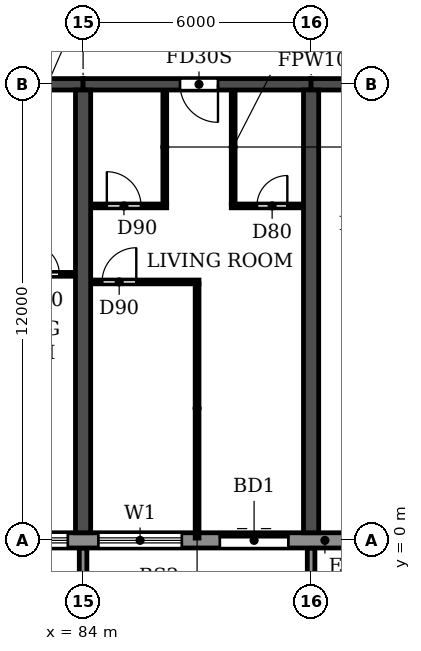
"""IFC4 building model, lengths in metres.
Left out: names, types, materials, properties, quantities, classifications, styles, units other than length and angle.
Written with IfcOpenShell. Run it as: python <this file> out.ifc"""

import sys

from ifc_helpers import new_model, si_unit, direction, frame, frame_2d, origin, place, context, subcontext, project, spatial, polyline, rectangle, outline, extrude, source, transform, mapped, element, fill, save


model = new_model("IFC4")
c1 = context("Model", 3, precision=1e-05, world=origin(), true_north=direction((0.0, 1.0)))
c2 = subcontext(c1, "Body", "Model", "MODEL_VIEW")
j1 = project(units=[si_unit("LENGTHUNIT", "METRE"), si_unit("PLANEANGLEUNIT", "RADIAN")], contexts=[c1])
p1 = place(None, origin())
s1 = spatial("IfcSite", under=j1, at=p1, CompositionType="ELEMENT")
p2 = place(p1, origin())
s2 = spatial("IfcBuilding", under=s1, at=p2, CompositionType="ELEMENT")
p3 = place(p2, frame((0.0, 0.0, 56.4)))
s3 = spatial("IfcBuildingStorey", under=s2, at=p3, CompositionType="ELEMENT", Elevation=56.4)
for number, where, z_axis, x_axis in (
    (1, (84.0, 0.2, 0.0), (0.0, 0.0, 1.0), (0.0, 1.0, 0.0)),
    (2, (90.0, 0.2, 0.0), (0.0, 0.0, 1.0), (0.0, 1.0, 0.0)),
):
    element("IfcWall", number, at=place(p3, frame(where, z_axis=z_axis, x_axis=x_axis)), inside=s3, PredefinedType="SHEAR", context=c2, shape_type="SweptSolid", body=[
        extrude(rectangle(XDim=11.65, YDim=0.4, at=frame_2d((5.825, 0.0))), origin(), (0.0, 0.0, 1.0), 3.05),
    ])
p4 = place(p3, frame((78.0, 12.0, 0.0), z_axis=(0.0, 0.0, 1.0), x_axis=(1.0, 0.0, 0.0)))
e3 = element("IfcWall", 3, at=p4, inside=s3, PredefinedType="SHEAR", context=c2, shape_type="SweptSolid", body=[
    extrude(rectangle(XDim=6.0, YDim=0.3, at=frame_2d((3.0, 0.0))), origin(), (0.0, 0.0, 1.0), 2.45),
])
p5 = place(p4, frame((2.55, 0.0, 0.0)))
e4 = element("IfcOpeningElement", 4, at=p5, cuts=e3, PredefinedType="OPENING", context=c2, shape_type="SweptSolid", body=[
    extrude(rectangle(XDim=1.0, YDim=2.1, at=frame_2d((0.5, 1.05))), frame((0.0, 0.16, 0.0), z_axis=(0.0, -1.0, 0.0), x_axis=(1.0, 0.0, 0.0)), (0.0, 0.0, 1.0), 0.32),
])
p6 = place(p3, frame((84.0, 12.0, 0.0), z_axis=(0.0, 0.0, 1.0), x_axis=(1.0, 0.0, 0.0)))
e5 = element("IfcWall", 5, at=p6, inside=s3, PredefinedType="SHEAR", context=c2, shape_type="SweptSolid", body=[
    extrude(rectangle(XDim=6.0, YDim=0.3, at=frame_2d((3.0, 0.0))), origin(), (0.0, 0.0, 1.0), 2.45),
])
p7 = place(p6, frame((2.55, 0.0, 0.0)))
e6 = element("IfcOpeningElement", 6, at=p7, cuts=e5, PredefinedType="OPENING", context=c2, shape_type="SweptSolid", body=[
    extrude(rectangle(XDim=1.0, YDim=2.1, at=frame_2d((0.5, 1.05))), frame((0.0, 0.16, 0.0), z_axis=(0.0, -1.0, 0.0), x_axis=(1.0, 0.0, 0.0)), (0.0, 0.0, 1.0), 0.32),
])
p8 = place(p3, frame((90.0, 12.0, 0.0), z_axis=(0.0, 0.0, 1.0), x_axis=(1.0, 0.0, 0.0)))
e7 = element("IfcWall", 7, at=p8, inside=s3, PredefinedType="SHEAR", context=c2, shape_type="SweptSolid", body=[
    extrude(rectangle(XDim=5.8, YDim=0.3, at=frame_2d((2.9, 0.0))), origin(), (0.0, 0.0, 1.0), 2.45),
])
p9 = place(p8, frame((2.5, 0.0, 0.0)))
e8 = element("IfcOpeningElement", 8, at=p9, cuts=e7, PredefinedType="OPENING", context=c2, shape_type="SweptSolid", body=[
    extrude(rectangle(XDim=1.0, YDim=2.1, at=frame_2d((0.5, 1.05))), frame((0.0, 0.16, 0.0), z_axis=(0.0, -1.0, 0.0), x_axis=(1.0, 0.0, 0.0)), (0.0, 0.0, 1.0), 0.32),
])
p10 = place(p3, frame((10.683, 0.0, 0.0), z_axis=(0.0, 0.0, 1.0), x_axis=(1.0, 0.0, 0.0)))
e9 = element("IfcWall", 9, at=p10, inside=s3, PredefinedType="STANDARD", context=c2, shape_type="SweptSolid", body=[
    extrude(rectangle(XDim=80.634, YDim=0.4, at=frame_2d((40.317, 0.0))), origin(), (0.0, 0.0, 1.0), 3.05),
])
p11 = place(p10, frame((1.717, 0.0, 0.9)))
e10 = element("IfcOpeningElement", 10, at=p11, cuts=e9, PredefinedType="OPENING", context=c2, shape_type="SweptSolid", body=[
    extrude(rectangle(XDim=2.2, YDim=1.5, at=frame_2d((1.1, 0.75))), frame((0.0, 0.21, 0.0), z_axis=(0.0, -1.0, 0.0), x_axis=(1.0, 0.0, 0.0)), (0.0, 0.0, 1.0), 0.42),
])
p12 = place(p10, frame((4.917, 0.0, 0.0)))
e11 = element("IfcOpeningElement", 11, at=p12, cuts=e9, PredefinedType="OPENING", context=c2, shape_type="SweptSolid", body=[
    extrude(rectangle(XDim=1.8, YDim=2.4, at=frame_2d((0.9, 1.2))), frame((0.0, 0.21, 0.0), z_axis=(0.0, -1.0, 0.0), x_axis=(1.0, 0.0, 0.0)), (0.0, 0.0, 1.0), 0.42),
])
p13 = place(p10, frame((7.717, 0.0, 0.9)))
e12 = element("IfcOpeningElement", 12, at=p13, cuts=e9, PredefinedType="OPENING", context=c2, shape_type="SweptSolid", body=[
    extrude(rectangle(XDim=2.2, YDim=1.5, at=frame_2d((1.1, 0.75))), frame((0.0, 0.21, 0.0), z_axis=(0.0, -1.0, 0.0), x_axis=(1.0, 0.0, 0.0)), (0.0, 0.0, 1.0), 0.42),
])
p14 = place(p10, frame((10.717, 0.0, 0.9)))
e13 = element("IfcOpeningElement", 13, at=p14, cuts=e9, PredefinedType="OPENING", context=c2, shape_type="SweptSolid", body=[
    extrude(rectangle(XDim=2.2, YDim=1.5, at=frame_2d((1.1, 0.75))), frame((0.0, 0.21, 0.0), z_axis=(0.0, -1.0, 0.0), x_axis=(1.0, 0.0, 0.0)), (0.0, 0.0, 1.0), 0.42),
])
p15 = place(p10, frame((13.717, 0.0, 0.9)))
e14 = element("IfcOpeningElement", 14, at=p15, cuts=e9, PredefinedType="OPENING", context=c2, shape_type="SweptSolid", body=[
    extrude(rectangle(XDim=2.2, YDim=1.5, at=frame_2d((1.1, 0.75))), frame((0.0, 0.21, 0.0), z_axis=(0.0, -1.0, 0.0), x_axis=(1.0, 0.0, 0.0)), (0.0, 0.0, 1.0), 0.42),
])
p16 = place(p10, frame((16.917, 0.0, 0.0)))
e15 = element("IfcOpeningElement", 15, at=p16, cuts=e9, PredefinedType="OPENING", context=c2, shape_type="SweptSolid", body=[
    extrude(rectangle(XDim=1.8, YDim=2.4, at=frame_2d((0.9, 1.2))), frame((0.0, 0.21, 0.0), z_axis=(0.0, -1.0, 0.0), x_axis=(1.0, 0.0, 0.0)), (0.0, 0.0, 1.0), 0.42),
])
p17 = place(p10, frame((19.717, 0.0, 0.9)))
e16 = element("IfcOpeningElement", 16, at=p17, cuts=e9, PredefinedType="OPENING", context=c2, shape_type="SweptSolid", body=[
    extrude(rectangle(XDim=2.2, YDim=1.5, at=frame_2d((1.1, 0.75))), frame((0.0, 0.21, 0.0), z_axis=(0.0, -1.0, 0.0), x_axis=(1.0, 0.0, 0.0)), (0.0, 0.0, 1.0), 0.42),
])
p18 = place(p10, frame((22.717, 0.0, 0.9)))
e17 = element("IfcOpeningElement", 17, at=p18, cuts=e9, PredefinedType="OPENING", context=c2, shape_type="SweptSolid", body=[
    extrude(rectangle(XDim=2.2, YDim=1.5, at=frame_2d((1.1, 0.75))), frame((0.0, 0.21, 0.0), z_axis=(0.0, -1.0, 0.0), x_axis=(1.0, 0.0, 0.0)), (0.0, 0.0, 1.0), 0.42),
])
p19 = place(p10, frame((25.917, 0.0, 0.0)))
e18 = element("IfcOpeningElement", 18, at=p19, cuts=e9, PredefinedType="OPENING", context=c2, shape_type="SweptSolid", body=[
    extrude(rectangle(XDim=1.8, YDim=2.4, at=frame_2d((0.9, 1.2))), frame((0.0, 0.21, 0.0), z_axis=(0.0, -1.0, 0.0), x_axis=(1.0, 0.0, 0.0)), (0.0, 0.0, 1.0), 0.42),
])
p20 = place(p10, frame((28.717, 0.0, 0.9)))
e19 = element("IfcOpeningElement", 19, at=p20, cuts=e9, PredefinedType="OPENING", context=c2, shape_type="SweptSolid", body=[
    extrude(rectangle(XDim=2.2, YDim=1.5, at=frame_2d((1.1, 0.75))), frame((0.0, 0.21, 0.0), z_axis=(0.0, -1.0, 0.0), x_axis=(1.0, 0.0, 0.0)), (0.0, 0.0, 1.0), 0.42),
])
p21 = place(p10, frame((31.717, 0.0, 0.9)))
e20 = element("IfcOpeningElement", 20, at=p21, cuts=e9, PredefinedType="OPENING", context=c2, shape_type="SweptSolid", body=[
    extrude(rectangle(XDim=2.2, YDim=1.5, at=frame_2d((1.1, 0.75))), frame((0.0, 0.21, 0.0), z_axis=(0.0, -1.0, 0.0), x_axis=(1.0, 0.0, 0.0)), (0.0, 0.0, 1.0), 0.42),
])
p22 = place(p10, frame((34.717, 0.0, 0.9)))
e21 = element("IfcOpeningElement", 21, at=p22, cuts=e9, PredefinedType="OPENING", context=c2, shape_type="SweptSolid", body=[
    extrude(rectangle(XDim=2.2, YDim=1.5, at=frame_2d((1.1, 0.75))), frame((0.0, 0.21, 0.0), z_axis=(0.0, -1.0, 0.0), x_axis=(1.0, 0.0, 0.0)), (0.0, 0.0, 1.0), 0.42),
])
p23 = place(p10, frame((37.717, 0.0, 0.9)))
e22 = element("IfcOpeningElement", 22, at=p23, cuts=e9, PredefinedType="OPENING", context=c2, shape_type="SweptSolid", body=[
    extrude(rectangle(XDim=2.2, YDim=1.5, at=frame_2d((1.1, 0.75))), frame((0.0, 0.21, 0.0), z_axis=(0.0, -1.0, 0.0), x_axis=(1.0, 0.0, 0.0)), (0.0, 0.0, 1.0), 0.42),
])
p24 = place(p10, frame((40.917, 0.0, 0.0)))
e23 = element("IfcOpeningElement", 23, at=p24, cuts=e9, PredefinedType="OPENING", context=c2, shape_type="SweptSolid", body=[
    extrude(rectangle(XDim=1.8, YDim=2.4, at=frame_2d((0.9, 1.2))), frame((0.0, 0.21, 0.0), z_axis=(0.0, -1.0, 0.0), x_axis=(1.0, 0.0, 0.0)), (0.0, 0.0, 1.0), 0.42),
])
p25 = place(p10, frame((43.717, 0.0, 0.9)))
e24 = element("IfcOpeningElement", 24, at=p25, cuts=e9, PredefinedType="OPENING", context=c2, shape_type="SweptSolid", body=[
    extrude(rectangle(XDim=2.2, YDim=1.5, at=frame_2d((1.1, 0.75))), frame((0.0, 0.21, 0.0), z_axis=(0.0, -1.0, 0.0), x_axis=(1.0, 0.0, 0.0)), (0.0, 0.0, 1.0), 0.42),
])
p26 = place(p10, frame((46.717, 0.0, 0.9)))
e25 = element("IfcOpeningElement", 25, at=p26, cuts=e9, PredefinedType="OPENING", context=c2, shape_type="SweptSolid", body=[
    extrude(rectangle(XDim=2.2, YDim=1.5, at=frame_2d((1.1, 0.75))), frame((0.0, 0.21, 0.0), z_axis=(0.0, -1.0, 0.0), x_axis=(1.0, 0.0, 0.0)), (0.0, 0.0, 1.0), 0.42),
])
p27 = place(p10, frame((49.717, 0.0, 0.9)))
e26 = element("IfcOpeningElement", 26, at=p27, cuts=e9, PredefinedType="OPENING", context=c2, shape_type="SweptSolid", body=[
    extrude(rectangle(XDim=2.2, YDim=1.5, at=frame_2d((1.1, 0.75))), frame((0.0, 0.21, 0.0), z_axis=(0.0, -1.0, 0.0), x_axis=(1.0, 0.0, 0.0)), (0.0, 0.0, 1.0), 0.42),
])
p28 = place(p10, frame((52.717, 0.0, 0.9)))
e27 = element("IfcOpeningElement", 27, at=p28, cuts=e9, PredefinedType="OPENING", context=c2, shape_type="SweptSolid", body=[
    extrude(rectangle(XDim=2.2, YDim=1.5, at=frame_2d((1.1, 0.75))), frame((0.0, 0.21, 0.0), z_axis=(0.0, -1.0, 0.0), x_axis=(1.0, 0.0, 0.0)), (0.0, 0.0, 1.0), 0.42),
])
p29 = place(p10, frame((55.717, 0.0, 0.9)))
e28 = element("IfcOpeningElement", 28, at=p29, cuts=e9, PredefinedType="OPENING", context=c2, shape_type="SweptSolid", body=[
    extrude(rectangle(XDim=2.2, YDim=1.5, at=frame_2d((1.1, 0.75))), frame((0.0, 0.21, 0.0), z_axis=(0.0, -1.0, 0.0), x_axis=(1.0, 0.0, 0.0)), (0.0, 0.0, 1.0), 0.42),
])
p30 = place(p10, frame((58.717, 0.0, 0.9)))
e29 = element("IfcOpeningElement", 29, at=p30, cuts=e9, PredefinedType="OPENING", context=c2, shape_type="SweptSolid", body=[
    extrude(rectangle(XDim=2.2, YDim=1.5, at=frame_2d((1.1, 0.75))), frame((0.0, 0.21, 0.0), z_axis=(0.0, -1.0, 0.0), x_axis=(1.0, 0.0, 0.0)), (0.0, 0.0, 1.0), 0.42),
])
p31 = place(p10, frame((61.717, 0.0, 0.9)))
e30 = element("IfcOpeningElement", 30, at=p31, cuts=e9, PredefinedType="OPENING", context=c2, shape_type="SweptSolid", body=[
    extrude(rectangle(XDim=2.2, YDim=1.5, at=frame_2d((1.1, 0.75))), frame((0.0, 0.21, 0.0), z_axis=(0.0, -1.0, 0.0), x_axis=(1.0, 0.0, 0.0)), (0.0, 0.0, 1.0), 0.42),
])
p32 = place(p10, frame((64.917, 0.0, 0.0)))
e31 = element("IfcOpeningElement", 31, at=p32, cuts=e9, PredefinedType="OPENING", context=c2, shape_type="SweptSolid", body=[
    extrude(rectangle(XDim=1.8, YDim=2.4, at=frame_2d((0.9, 1.2))), frame((0.0, 0.21, 0.0), z_axis=(0.0, -1.0, 0.0), x_axis=(1.0, 0.0, 0.0)), (0.0, 0.0, 1.0), 0.42),
])
p33 = place(p10, frame((67.717, 0.0, 0.9)))
e32 = element("IfcOpeningElement", 32, at=p33, cuts=e9, PredefinedType="OPENING", context=c2, shape_type="SweptSolid", body=[
    extrude(rectangle(XDim=2.2, YDim=1.5, at=frame_2d((1.1, 0.75))), frame((0.0, 0.21, 0.0), z_axis=(0.0, -1.0, 0.0), x_axis=(1.0, 0.0, 0.0)), (0.0, 0.0, 1.0), 0.42),
])
p34 = place(p10, frame((70.717, 0.0, 0.9)))
e33 = element("IfcOpeningElement", 33, at=p34, cuts=e9, PredefinedType="OPENING", context=c2, shape_type="SweptSolid", body=[
    extrude(rectangle(XDim=2.2, YDim=1.5, at=frame_2d((1.1, 0.75))), frame((0.0, 0.21, 0.0), z_axis=(0.0, -1.0, 0.0), x_axis=(1.0, 0.0, 0.0)), (0.0, 0.0, 1.0), 0.42),
])
p35 = place(p10, frame((73.717, 0.0, 0.9)))
e34 = element("IfcOpeningElement", 34, at=p35, cuts=e9, PredefinedType="OPENING", context=c2, shape_type="SweptSolid", body=[
    extrude(rectangle(XDim=2.2, YDim=1.5, at=frame_2d((1.1, 0.75))), frame((0.0, 0.21, 0.0), z_axis=(0.0, -1.0, 0.0), x_axis=(1.0, 0.0, 0.0)), (0.0, 0.0, 1.0), 0.42),
])
p36 = place(p10, frame((76.917, 0.0, 0.0)))
e35 = element("IfcOpeningElement", 35, at=p36, cuts=e9, PredefinedType="OPENING", context=c2, shape_type="SweptSolid", body=[
    extrude(rectangle(XDim=1.8, YDim=2.4, at=frame_2d((0.9, 1.2))), frame((0.0, 0.21, 0.0), z_axis=(0.0, -1.0, 0.0), x_axis=(1.0, 0.0, 0.0)), (0.0, 0.0, 1.0), 0.42),
])
m1 = source(origin(), c2, "Body", "SweptSolid", [
    extrude(outline(polyline([(0.0, 0.0), (0.2, 0.0), (0.2, 1.65), (0.0, 1.65), (0.0, 0.0)])), origin(), (0.0, 0.0, 1.0), 3.1),
])
for number, where in (
    (36, (83.9, -1.85, 0.0)),
    (37, (89.9, -1.85, 0.0)),
):
    element("IfcWall", number, at=place(p3, frame(where)), inside=s3, PredefinedType="STANDARD", context=c2, shape_type="MappedRepresentation", body=[
        mapped(m1, transform((0.0, 0.0, 0.0))),
    ])
p37 = place(p3, frame((84.21, 6.8, 0.0), z_axis=(0.0, 0.0, 1.0), x_axis=(1.0, 0.0, 0.0)))
e38 = element("IfcWall", 38, at=p37, inside=s3, PredefinedType="PARTITIONING", context=c2, shape_type="SweptSolid", body=[
    extrude(rectangle(XDim=2.84, YDim=0.1, at=frame_2d((1.42, 0.0))), origin(), (0.0, 0.0, 1.0), 3.05),
])
p38 = place(p37, frame((0.29, 0.0, 0.0)))
e39 = element("IfcOpeningElement", 39, at=p38, cuts=e38, PredefinedType="OPENING", context=c2, shape_type="SweptSolid", body=[
    extrude(rectangle(XDim=0.9, YDim=2.1, at=frame_2d((0.45, 1.05))), frame((0.0, 0.06, 0.0), z_axis=(0.0, -1.0, 0.0), x_axis=(1.0, 0.0, 0.0)), (0.0, 0.0, 1.0), 0.12),
])
p39 = place(p3, frame((81.9, 7.0, 0.0), z_axis=(0.0, 0.0, 1.0), x_axis=(1.0, 0.0, 0.0)))
e40 = element("IfcWall", 40, at=p39, inside=s3, PredefinedType="PARTITIONING", context=c2, shape_type="SweptSolid", body=[
    extrude(rectangle(XDim=1.89, YDim=0.1, at=frame_2d((0.945, 0.0))), origin(), (0.0, 0.0, 1.0), 3.05),
])
p40 = place(p39, frame((0.675, 0.0, 0.0)))
e41 = element("IfcOpeningElement", 41, at=p40, cuts=e40, PredefinedType="OPENING", context=c2, shape_type="SweptSolid", body=[
    extrude(rectangle(XDim=0.8, YDim=2.1, at=frame_2d((0.4, 1.05))), frame((0.0, 0.06, 0.0), z_axis=(0.0, -1.0, 0.0), x_axis=(1.0, 0.0, 0.0)), (0.0, 0.0, 1.0), 0.12),
])
p41 = place(p3, frame((84.21, 8.8, 0.0), z_axis=(0.0, 0.0, 1.0), x_axis=(1.0, 0.0, 0.0)))
e42 = element("IfcWall", 42, at=p41, inside=s3, PredefinedType="PARTITIONING", context=c2, shape_type="SweptSolid", body=[
    extrude(rectangle(XDim=1.99, YDim=0.1, at=frame_2d((0.995, 0.0))), origin(), (0.0, 0.0, 1.0), 3.05),
])
p42 = place(p41, frame((0.415, 0.0, 0.0)))
e43 = element("IfcOpeningElement", 43, at=p42, cuts=e42, PredefinedType="OPENING", context=c2, shape_type="SweptSolid", body=[
    extrude(rectangle(XDim=0.9, YDim=2.1, at=frame_2d((0.45, 1.05))), frame((0.0, 0.06, 0.0), z_axis=(0.0, -1.0, 0.0), x_axis=(1.0, 0.0, 0.0)), (0.0, 0.0, 1.0), 0.12),
])
p43 = place(p3, frame((87.9, 8.8, 0.0), z_axis=(0.0, 0.0, 1.0), x_axis=(1.0, 0.0, 0.0)))
e44 = element("IfcWall", 44, at=p43, inside=s3, PredefinedType="PARTITIONING", context=c2, shape_type="SweptSolid", body=[
    extrude(rectangle(XDim=1.89, YDim=0.1, at=frame_2d((0.945, 0.0))), origin(), (0.0, 0.0, 1.0), 3.05),
])
p44 = place(p43, frame((0.675, 0.0, 0.0)))
e45 = element("IfcOpeningElement", 45, at=p44, cuts=e44, PredefinedType="OPENING", context=c2, shape_type="SweptSolid", body=[
    extrude(rectangle(XDim=0.8, YDim=2.1, at=frame_2d((0.4, 1.05))), frame((0.0, 0.06, 0.0), z_axis=(0.0, -1.0, 0.0), x_axis=(1.0, 0.0, 0.0)), (0.0, 0.0, 1.0), 0.12),
])
p45 = place(p3, frame((86.15, 8.85, 0.0), z_axis=(0.0, 0.0, 1.0), x_axis=(0.0, 1.0, 0.0)))
e46 = element("IfcWall", 46, at=p45, inside=s3, PredefinedType="PARTITIONING", context=c2, shape_type="SweptSolid", body=[
    extrude(rectangle(XDim=2.99, YDim=0.1, at=frame_2d((1.495, 0.0))), origin(), (0.0, 0.0, 1.0), 3.05),
])
p46 = place(p3, frame((87.0, 0.06, 0.0), z_axis=(0.0, 0.0, 1.0), x_axis=(0.0, 1.0, 0.0)))
e47 = element("IfcWall", 47, at=p46, inside=s3, PredefinedType="PARTITIONING", context=c2, shape_type="SweptSolid", body=[
    extrude(rectangle(XDim=6.69, YDim=0.1, at=frame_2d((3.345, 0.0))), origin(), (0.0, 0.0, 1.0), 3.05),
])
p47 = place(p3, frame((87.95, 8.85, 0.0), z_axis=(0.0, 0.0, 1.0), x_axis=(0.0, 1.0, 0.0)))
e48 = element("IfcWall", 48, at=p47, inside=s3, PredefinedType="PARTITIONING", context=c2, shape_type="SweptSolid", body=[
    extrude(rectangle(XDim=2.99, YDim=0.1, at=frame_2d((1.495, 0.0))), origin(), (0.0, 0.0, 1.0), 3.05),
])
p48 = place(p34, origin())
e49 = element("IfcWindow", 49, at=p48, inside=s3, PartitioningType="DOUBLE_PANEL_HORIZONTAL", PredefinedType="WINDOW", context=c2, shape_type="SweptSolid", body=[
    extrude(rectangle(XDim=2.2, YDim=1.5, at=frame_2d((1.1, 0.75))), frame((0.0, 0.03, 0.0), z_axis=(0.0, -1.0, 0.0), x_axis=(1.0, 0.0, 0.0)), (0.0, 0.0, 1.0), 0.06),
])
fill(e33, e49)
p49 = place(p35, origin())
e50 = element("IfcWindow", 50, at=p49, inside=s3, PartitioningType="DOUBLE_PANEL_HORIZONTAL", PredefinedType="WINDOW", context=c2, shape_type="SweptSolid", body=[
    extrude(rectangle(XDim=2.2, YDim=1.5, at=frame_2d((1.1, 0.75))), frame((0.0, 0.03, 0.0), z_axis=(0.0, -1.0, 0.0), x_axis=(1.0, 0.0, 0.0)), (0.0, 0.0, 1.0), 0.06),
])
fill(e34, e50)
p50 = place(p36, origin())
e51 = element("IfcDoor", 51, at=p50, inside=s3, OperationType="DOUBLE_DOOR_SLIDING", PredefinedType="DOOR", context=c2, shape_type="SweptSolid", body=[
    extrude(rectangle(XDim=1.8, YDim=2.4, at=frame_2d((0.9, 1.2))), frame((0.0, 0.025, 0.0), z_axis=(0.0, -1.0, 0.0), x_axis=(1.0, 0.0, 0.0)), (0.0, 0.0, 1.0), 0.05),
])
fill(e35, e51)
p51 = place(p40, origin())
e52 = element("IfcDoor", 52, at=p51, inside=s3, OperationType="SINGLE_SWING_LEFT", PredefinedType="DOOR", context=c2, shape_type="SweptSolid", body=[
    extrude(rectangle(XDim=0.8, YDim=2.1, at=frame_2d((0.4, 1.05))), frame((0.0, 0.025, 0.0), z_axis=(0.0, -1.0, 0.0), x_axis=(1.0, 0.0, 0.0)), (0.0, 0.0, 1.0), 0.05),
])
fill(e41, e52)
p52 = place(p38, origin())
e53 = element("IfcDoor", 53, at=p52, inside=s3, OperationType="SINGLE_SWING_RIGHT", PredefinedType="DOOR", context=c2, shape_type="SweptSolid", body=[
    extrude(rectangle(XDim=0.9, YDim=2.1, at=frame_2d((0.45, 1.05))), frame((0.0, 0.025, 0.0), z_axis=(0.0, -1.0, 0.0), x_axis=(1.0, 0.0, 0.0)), (0.0, 0.0, 1.0), 0.05),
])
fill(e39, e53)
p53 = place(p42, origin())
e54 = element("IfcDoor", 54, at=p53, inside=s3, OperationType="SINGLE_SWING_LEFT", PredefinedType="DOOR", context=c2, shape_type="SweptSolid", body=[
    extrude(rectangle(XDim=0.9, YDim=2.1, at=frame_2d((0.45, 1.05))), frame((0.0, 0.025, 0.0), z_axis=(0.0, -1.0, 0.0), x_axis=(1.0, 0.0, 0.0)), (0.0, 0.0, 1.0), 0.05),
])
fill(e43, e54)
p54 = place(p7, frame((1.0, 0.0, 0.0), z_axis=(0.0, 0.0, 1.0), x_axis=(-1.0, 0.0, 0.0)))
e55 = element("IfcDoor", 55, at=p54, inside=s3, OperationType="SINGLE_SWING_LEFT", PredefinedType="DOOR", context=c2, shape_type="SweptSolid", body=[
    extrude(rectangle(XDim=1.0, YDim=2.1, at=frame_2d((0.5, 1.05))), frame((0.0, 0.025, 0.0), z_axis=(0.0, -1.0, 0.0), x_axis=(1.0, 0.0, 0.0)), (0.0, 0.0, 1.0), 0.05),
])
fill(e6, e55)
p55 = place(p44, origin())
e56 = element("IfcDoor", 56, at=p55, inside=s3, OperationType="SINGLE_SWING_RIGHT", PredefinedType="DOOR", context=c2, shape_type="SweptSolid", body=[
    extrude(rectangle(XDim=0.8, YDim=2.1, at=frame_2d((0.4, 1.05))), frame((0.0, 0.025, 0.0), z_axis=(0.0, -1.0, 0.0), x_axis=(1.0, 0.0, 0.0)), (0.0, 0.0, 1.0), 0.05),
])
fill(e45, e56)
save(model, sys.argv[1])
